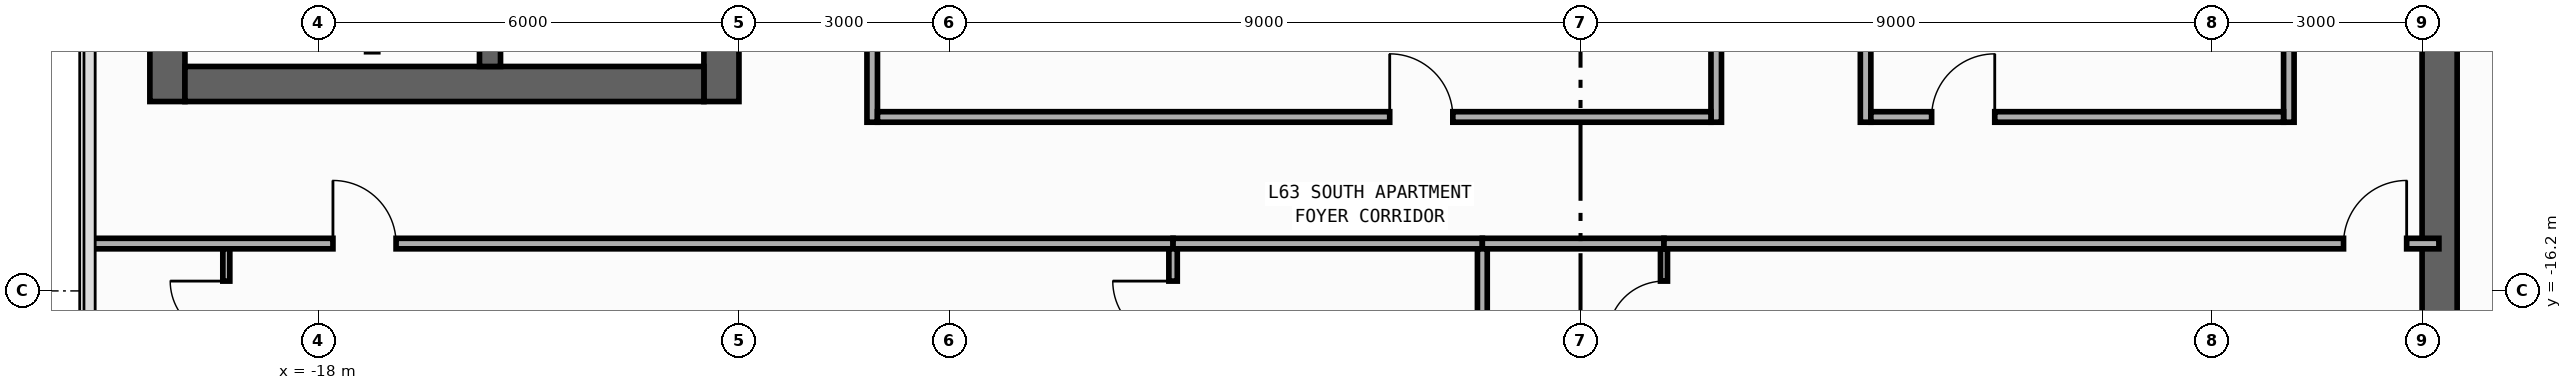
"""IFC4 building model, lengths in metres.
Left out: names, types, materials, properties, quantities, classifications, styles, units other than length and angle.
Written with IfcOpenShell. Run it as: python <this file> out.ifc"""

import sys

from ifc_helpers import new_model, si_unit, direction, frame, frame_2d, origin, place, context, subcontext, project, spatial, rectangle, extrude, element, fill, save


model = new_model("IFC4")
c1 = context("Model", 3, precision=1e-05, world=origin(), true_north=direction((0.0, 1.0)))
c2 = subcontext(c1, "Body", "Model", "MODEL_VIEW")
j1 = project(units=[si_unit("LENGTHUNIT", "METRE"), si_unit("PLANEANGLEUNIT", "RADIAN")], contexts=[c1])
p1 = place(None, origin())
s1 = spatial("IfcSite", under=j1, at=p1, CompositionType="ELEMENT")
p2 = place(p1, origin())
s2 = spatial("IfcBuilding", under=s1, at=p2, CompositionType="ELEMENT")
p3 = place(p2, frame((0.0, 0.0, 265.6)))
s3 = spatial("IfcBuildingStorey", under=s2, at=p3, CompositionType="ELEMENT", Elevation=265.6)
p4 = place(p3, frame((-20.15, -13.5, 0.0), z_axis=(0.0, 0.0, 1.0), x_axis=(0.0, 1.0, 0.0)))
e1 = element("IfcWall", 1, at=p4, inside=s3, PredefinedType="SHEAR", context=c2, shape_type="SweptSolid", body=[
    extrude(rectangle(XDim=27.0, YDim=0.5, at=frame_2d((13.5, 0.0))), origin(), (0.0, 0.0, 1.0), 3.34),
])
p5 = place(p3, frame((-12.25, -13.5, 0.0), z_axis=(0.0, 0.0, 1.0), x_axis=(0.0, 1.0, 0.0)))
e2 = element("IfcWall", 2, at=p5, inside=s3, PredefinedType="SHEAR", context=c2, shape_type="SweptSolid", body=[
    extrude(rectangle(XDim=27.0, YDim=0.5, at=frame_2d((13.5, 0.0))), origin(), (0.0, 0.0, 1.0), 3.34),
])
p6 = place(p5, frame((15.175, 0.0, 0.0)))
e3 = element("IfcOpeningElement", 3, at=p6, cuts=e2, PredefinedType="OPENING", context=c2, shape_type="SweptSolid", body=[
    extrude(rectangle(XDim=0.85, YDim=2.1, at=frame_2d((0.425, 1.05))), frame((0.0, 0.26, 0.0), z_axis=(0.0, -1.0, 0.0), x_axis=(1.0, 0.0, 0.0)), (0.0, 0.0, 1.0), 0.52),
])
p7 = place(p5, frame((21.275, 0.0, 0.0)))
e4 = element("IfcOpeningElement", 4, at=p7, cuts=e2, PredefinedType="OPENING", context=c2, shape_type="SweptSolid", body=[
    extrude(rectangle(XDim=0.85, YDim=2.1, at=frame_2d((0.425, 1.05))), frame((0.0, 0.26, 0.0), z_axis=(0.0, -1.0, 0.0), x_axis=(1.0, 0.0, 0.0)), (0.0, 0.0, 1.0), 0.52),
])
p8 = place(p5, frame((4.275, 0.0, 0.0)))
e5 = element("IfcOpeningElement", 5, at=p8, cuts=e2, PredefinedType="OPENING", context=c2, shape_type="SweptSolid", body=[
    extrude(rectangle(XDim=0.85, YDim=2.1, at=frame_2d((0.425, 1.05))), frame((0.0, 0.26, 0.0), z_axis=(0.0, -1.0, 0.0), x_axis=(1.0, 0.0, 0.0)), (0.0, 0.0, 1.0), 0.52),
])
p9 = place(p5, frame((10.275, 0.0, 0.0)))
e6 = element("IfcOpeningElement", 6, at=p9, cuts=e2, PredefinedType="OPENING", context=c2, shape_type="SweptSolid", body=[
    extrude(rectangle(XDim=0.85, YDim=2.1, at=frame_2d((0.425, 1.05))), frame((0.0, 0.26, 0.0), z_axis=(0.0, -1.0, 0.0), x_axis=(1.0, 0.0, 0.0)), (0.0, 0.0, 1.0), 0.52),
])
p10 = place(p5, frame((12.725, 0.0, 0.0)))
e7 = element("IfcOpeningElement", 7, at=p10, cuts=e2, PredefinedType="OPENING", context=c2, shape_type="SweptSolid", body=[
    extrude(rectangle(XDim=1.15, YDim=2.2, at=frame_2d((0.575, 1.1))), frame((0.0, 0.26, 0.0), z_axis=(0.0, -1.0, 0.0), x_axis=(1.0, 0.0, 0.0)), (0.0, 0.0, 1.0), 0.52),
])
p11 = place(p5, frame((1.625, 0.0, 0.0)))
e8 = element("IfcOpeningElement", 8, at=p11, cuts=e2, PredefinedType="OPENING", context=c2, shape_type="SweptSolid", body=[
    extrude(rectangle(XDim=0.85, YDim=2.1, at=frame_2d((0.425, 1.05))), frame((0.0, 0.26, 0.0), z_axis=(0.0, -1.0, 0.0), x_axis=(1.0, 0.0, 0.0)), (0.0, 0.0, 1.0), 0.52),
])
p12 = place(p3, frame((-19.9, -13.25, 0.0), z_axis=(0.0, 0.0, 1.0), x_axis=(1.0, 0.0, 0.0)))
e9 = element("IfcWall", 9, at=p12, inside=s3, PredefinedType="SHEAR", context=c2, shape_type="SweptSolid", body=[
    extrude(rectangle(XDim=7.4, YDim=0.5, at=frame_2d((3.7, 0.0))), origin(), (0.0, 0.0, 1.0), 3.34),
])
p13 = place(p3, frame((-15.55, -13.0, 0.0), z_axis=(0.0, 0.0, 1.0), x_axis=(0.0, 1.0, 0.0)))
e10 = element("IfcWall", 10, at=p13, inside=s3, PredefinedType="SHEAR", context=c2, shape_type="SweptSolid", body=[
    extrude(rectangle(XDim=26.0, YDim=0.3, at=frame_2d((13.0, 0.0))), origin(), (0.0, 0.0, 1.0), 3.34),
])
p14 = place(p13, frame((12.225, 0.0, 0.0)))
e11 = element("IfcOpeningElement", 11, at=p14, cuts=e10, PredefinedType="OPENING", context=c2, shape_type="SweptSolid", body=[
    extrude(rectangle(XDim=1.15, YDim=2.2, at=frame_2d((0.575, 1.1))), frame((0.0, 0.16, 0.0), z_axis=(0.0, -1.0, 0.0), x_axis=(1.0, 0.0, 0.0)), (0.0, 0.0, 1.0), 0.32),
])
p15 = place(p13, frame((1.125, 0.0, 0.0)))
e12 = element("IfcOpeningElement", 12, at=p15, cuts=e10, PredefinedType="OPENING", context=c2, shape_type="SweptSolid", body=[
    extrude(rectangle(XDim=0.85, YDim=2.1, at=frame_2d((0.425, 1.05))), frame((0.0, 0.16, 0.0), z_axis=(0.0, -1.0, 0.0), x_axis=(1.0, 0.0, 0.0)), (0.0, 0.0, 1.0), 0.32),
])
p16 = place(p3, frame((12.25, -19.8, 0.0), z_axis=(0.0, 0.0, 1.0), x_axis=(0.0, 1.0, 0.0)))
e13 = element("IfcWall", 13, at=p16, inside=s3, PredefinedType="SHEAR", context=c2, shape_type="SweptSolid", body=[
    extrude(rectangle(XDim=27.0, YDim=0.5, at=frame_2d((13.5, 0.0))), origin(), (0.0, 0.0, 1.0), 3.34),
])
p17 = place(p16, frame((23.05, 0.0, 0.0)))
e14 = element("IfcOpeningElement", 14, at=p17, cuts=e13, PredefinedType="OPENING", context=c2, shape_type="SweptSolid", body=[
    extrude(rectangle(XDim=1.1, YDim=2.2, at=frame_2d((0.55, 1.1))), frame((0.0, 0.26, 0.0), z_axis=(0.0, -1.0, 0.0), x_axis=(1.0, 0.0, 0.0)), (0.0, 0.0, 1.0), 0.52),
])
p18 = place(p16, frame((19.85, 0.0, 0.0)))
e15 = element("IfcOpeningElement", 15, at=p18, cuts=e13, PredefinedType="OPENING", context=c2, shape_type="SweptSolid", body=[
    extrude(rectangle(XDim=1.1, YDim=2.2, at=frame_2d((0.55, 1.1))), frame((0.0, 0.26, 0.0), z_axis=(0.0, -1.0, 0.0), x_axis=(1.0, 0.0, 0.0)), (0.0, 0.0, 1.0), 0.52),
])
p19 = place(p16, frame((16.65, 0.0, 0.0)))
e16 = element("IfcOpeningElement", 16, at=p19, cuts=e13, PredefinedType="OPENING", context=c2, shape_type="SweptSolid", body=[
    extrude(rectangle(XDim=1.1, YDim=2.2, at=frame_2d((0.55, 1.1))), frame((0.0, 0.26, 0.0), z_axis=(0.0, -1.0, 0.0), x_axis=(1.0, 0.0, 0.0)), (0.0, 0.0, 1.0), 0.52),
])
p20 = place(p16, frame((10.175, 0.0, 0.0)))
e17 = element("IfcOpeningElement", 17, at=p20, cuts=e13, PredefinedType="OPENING", context=c2, shape_type="SweptSolid", body=[
    extrude(rectangle(XDim=0.85, YDim=2.1, at=frame_2d((0.425, 1.05))), frame((0.0, 0.26, 0.0), z_axis=(0.0, -1.0, 0.0), x_axis=(1.0, 0.0, 0.0)), (0.0, 0.0, 1.0), 0.52),
])
p21 = place(p16, frame((12.725, 0.0, 0.0)))
e18 = element("IfcOpeningElement", 18, at=p21, cuts=e13, PredefinedType="OPENING", context=c2, shape_type="SweptSolid", body=[
    extrude(rectangle(XDim=1.15, YDim=2.2, at=frame_2d((0.575, 1.1))), frame((0.0, 0.26, 0.0), z_axis=(0.0, -1.0, 0.0), x_axis=(1.0, 0.0, 0.0)), (0.0, 0.0, 1.0), 0.52),
])
p22 = place(p16, frame((25.125, 0.0, 0.0)))
e19 = element("IfcOpeningElement", 19, at=p22, cuts=e13, PredefinedType="OPENING", context=c2, shape_type="SweptSolid", body=[
    extrude(rectangle(XDim=0.85, YDim=2.1, at=frame_2d((0.425, 1.05))), frame((0.0, 0.26, 0.0), z_axis=(0.0, -1.0, 0.0), x_axis=(1.0, 0.0, 0.0)), (0.0, 0.0, 1.0), 0.52),
])
p23 = place(p3, frame((-10.1, -13.795, 0.0), z_axis=(0.0, 0.0, 1.0), x_axis=(0.0, 1.0, 0.0)))
e20 = element("IfcWall", 20, at=p23, inside=s3, PredefinedType="PARTITIONING", context=c2, shape_type="SweptSolid", body=[
    extrude(rectangle(XDim=15.605, YDim=0.15, at=frame_2d((7.802, 0.0))), origin(), (0.0, 0.0, 1.0), 3.34),
])
p24 = place(p23, frame((7.961, 0.0, 0.0)))
e21 = element("IfcOpeningElement", 21, at=p24, cuts=e20, PredefinedType="OPENING", context=c2, shape_type="SweptSolid", body=[
    extrude(rectangle(XDim=0.9, YDim=2.15, at=frame_2d((0.45, 1.075))), frame((0.0, 0.085, 0.0), z_axis=(0.0, -1.0, 0.0), x_axis=(1.0, 0.0, 0.0)), (0.0, 0.0, 1.0), 0.17),
])
p25 = place(p3, frame((10.1, -13.795, 0.0), z_axis=(0.0, 0.0, 1.0), x_axis=(0.0, 1.0, 0.0)))
e22 = element("IfcWall", 22, at=p25, inside=s3, PredefinedType="PARTITIONING", context=c2, shape_type="SweptSolid", body=[
    extrude(rectangle(XDim=12.975, YDim=0.15, at=frame_2d((6.487, 0.0))), origin(), (0.0, 0.0, 1.0), 3.34),
])
p26 = place(p25, frame((7.964, 0.0, 0.0)))
e23 = element("IfcOpeningElement", 23, at=p26, cuts=e22, PredefinedType="OPENING", context=c2, shape_type="SweptSolid", body=[
    extrude(rectangle(XDim=0.9, YDim=2.15, at=frame_2d((0.45, 1.075))), frame((0.0, 0.085, 0.0), z_axis=(0.0, -1.0, 0.0), x_axis=(1.0, 0.0, 0.0)), (0.0, 0.0, 1.0), 0.17),
])
p27 = place(p3, frame((1.935, -13.795, 0.0), z_axis=(0.0, 0.0, 1.0), x_axis=(0.0, 1.0, 0.0)))
e24 = element("IfcWall", 24, at=p27, inside=s3, PredefinedType="PARTITIONING", context=c2, shape_type="SweptSolid", body=[
    extrude(rectangle(XDim=15.455, YDim=0.15, at=frame_2d((7.728, 0.0))), origin(), (0.0, 0.0, 1.0), 3.34),
])
p28 = place(p27, frame((7.879, 0.0, 0.0)))
e25 = element("IfcOpeningElement", 25, at=p28, cuts=e24, PredefinedType="OPENING", context=c2, shape_type="SweptSolid", body=[
    extrude(rectangle(XDim=0.9, YDim=2.15, at=frame_2d((0.45, 1.075))), frame((0.0, 0.085, 0.0), z_axis=(0.0, -1.0, 0.0), x_axis=(1.0, 0.0, 0.0)), (0.0, 0.0, 1.0), 0.17),
])
p29 = place(p3, frame((4.065, -13.795, 0.0), z_axis=(0.0, 0.0, 1.0), x_axis=(0.0, 1.0, 0.0)))
e26 = element("IfcWall", 26, at=p29, inside=s3, PredefinedType="PARTITIONING", context=c2, shape_type="SweptSolid", body=[
    extrude(rectangle(XDim=12.815, YDim=0.15, at=frame_2d((6.407, 0.0))), origin(), (0.0, 0.0, 1.0), 3.34),
])
p30 = place(p29, frame((7.994, 0.0, 0.0)))
e27 = element("IfcOpeningElement", 27, at=p30, cuts=e26, PredefinedType="OPENING", context=c2, shape_type="SweptSolid", body=[
    extrude(rectangle(XDim=0.9, YDim=2.15, at=frame_2d((0.45, 1.075))), frame((0.0, 0.085, 0.0), z_axis=(0.0, -1.0, 0.0), x_axis=(1.0, 0.0, 0.0)), (0.0, 0.0, 1.0), 0.17),
])
p31 = place(p3, frame((-21.255, -15.525, 0.0), z_axis=(0.0, 0.0, 1.0), x_axis=(1.0, 0.0, 0.0)))
e28 = element("IfcWall", 28, at=p31, inside=s3, PredefinedType="PARTITIONING", context=c2, shape_type="SweptSolid", body=[
    extrude(rectangle(XDim=15.445, YDim=0.15, at=frame_2d((7.722, 0.0))), origin(), (0.0, 0.0, 1.0), 3.34),
])
p32 = place(p31, frame((3.466, 0.0, 0.0)))
e29 = element("IfcOpeningElement", 29, at=p32, cuts=e28, PredefinedType="OPENING", context=c2, shape_type="SweptSolid", body=[
    extrude(rectangle(XDim=0.9, YDim=2.15, at=frame_2d((0.45, 1.075))), frame((0.0, 0.085, 0.0), z_axis=(0.0, -1.0, 0.0), x_axis=(1.0, 0.0, 0.0)), (0.0, 0.0, 1.0), 0.17),
])
p33 = place(p3, frame((-5.81, -15.525, 0.0), z_axis=(0.0, 0.0, 1.0), x_axis=(1.0, 0.0, 0.0)))
e30 = element("IfcWall", 30, at=p33, inside=s3, PredefinedType="PARTITIONING", context=c2, shape_type="SweptSolid", body=[
    extrude(rectangle(XDim=4.41, YDim=0.15, at=frame_2d((2.205, 0.0))), origin(), (0.0, 0.0, 1.0), 3.34),
])
p34 = place(p3, frame((-1.4, -15.525, 0.0), z_axis=(0.0, 0.0, 1.0), x_axis=(1.0, 0.0, 0.0)))
e31 = element("IfcWall", 31, at=p34, inside=s3, PredefinedType="PARTITIONING", context=c2, shape_type="SweptSolid", body=[
    extrude(rectangle(XDim=2.59, YDim=0.15, at=frame_2d((1.295, 0.0))), origin(), (0.0, 0.0, 1.0), 3.34),
])
p35 = place(p3, frame((1.19, -15.525, 0.0), z_axis=(0.0, 0.0, 1.0), x_axis=(1.0, 0.0, 0.0)))
e32 = element("IfcWall", 32, at=p35, inside=s3, PredefinedType="PARTITIONING", context=c2, shape_type="SweptSolid", body=[
    extrude(rectangle(XDim=11.05, YDim=0.15, at=frame_2d((5.525, 0.0))), origin(), (0.0, 0.0, 1.0), 3.34),
])
p36 = place(p35, frame((9.69, 0.0, 0.0)))
e33 = element("IfcOpeningElement", 33, at=p36, cuts=e32, PredefinedType="OPENING", context=c2, shape_type="SweptSolid", body=[
    extrude(rectangle(XDim=0.9, YDim=2.15, at=frame_2d((0.45, 1.075))), frame((0.0, 0.085, 0.0), z_axis=(0.0, -1.0, 0.0), x_axis=(1.0, 0.0, 0.0)), (0.0, 0.0, 1.0), 0.17),
])
p37 = place(p3, frame((-10.025, -13.72, 0.0), z_axis=(0.0, 0.0, 1.0), x_axis=(1.0, 0.0, 0.0)))
e34 = element("IfcWall", 34, at=p37, inside=s3, PredefinedType="PARTITIONING", context=c2, shape_type="SweptSolid", body=[
    extrude(rectangle(XDim=11.885, YDim=0.15, at=frame_2d((5.942, 0.0))), origin(), (0.0, 0.0, 1.0), 3.34),
])
p38 = place(p37, frame((7.304, 0.0, 0.0)))
e35 = element("IfcOpeningElement", 35, at=p38, cuts=e34, PredefinedType="OPENING", context=c2, shape_type="SweptSolid", body=[
    extrude(rectangle(XDim=0.9, YDim=2.15, at=frame_2d((0.45, 1.075))), frame((0.0, 0.085, 0.0), z_axis=(0.0, -1.0, 0.0), x_axis=(1.0, 0.0, 0.0)), (0.0, 0.0, 1.0), 0.17),
])
p39 = place(p3, frame((4.14, -13.72, 0.0), z_axis=(0.0, 0.0, 1.0), x_axis=(1.0, 0.0, 0.0)))
e36 = element("IfcWall", 36, at=p39, inside=s3, PredefinedType="PARTITIONING", context=c2, shape_type="SweptSolid", body=[
    extrude(rectangle(XDim=5.885, YDim=0.15, at=frame_2d((2.942, 0.0))), origin(), (0.0, 0.0, 1.0), 3.34),
])
p40 = place(p39, frame((0.866, 0.0, 0.0)))
e37 = element("IfcOpeningElement", 37, at=p40, cuts=e36, PredefinedType="OPENING", context=c2, shape_type="SweptSolid", body=[
    extrude(rectangle(XDim=0.9, YDim=2.15, at=frame_2d((0.45, 1.075))), frame((0.0, 0.085, 0.0), z_axis=(0.0, -1.0, 0.0), x_axis=(1.0, 0.0, 0.0)), (0.0, 0.0, 1.0), 0.17),
])
p41 = place(p3, frame((-19.31, -18.1, 0.0), z_axis=(0.0, 0.0, 1.0), x_axis=(0.0, 1.0, 0.0)))
e38 = element("IfcWall", 38, at=p41, inside=s3, PredefinedType="PARTITIONING", context=c2, shape_type="SweptSolid", body=[
    extrude(rectangle(XDim=2.5, YDim=0.1, at=frame_2d((1.25, 0.0))), origin(), (0.0, 0.0, 1.0), 3.34),
])
p42 = place(p41, frame((1.24, 0.0, 0.0)))
e39 = element("IfcOpeningElement", 39, at=p42, cuts=e38, PredefinedType="OPENING", context=c2, shape_type="SweptSolid", body=[
    extrude(rectangle(XDim=0.8, YDim=2.1, at=frame_2d((0.4, 1.05))), frame((0.0, 0.06, 0.0), z_axis=(0.0, -1.0, 0.0), x_axis=(1.0, 0.0, 0.0)), (0.0, 0.0, 1.0), 0.12),
])
p43 = place(p3, frame((-5.81, -20.1, 0.0), z_axis=(0.0, 0.0, 1.0), x_axis=(0.0, 1.0, 0.0)))
e40 = element("IfcWall", 40, at=p43, inside=s3, PredefinedType="PARTITIONING", context=c2, shape_type="SweptSolid", body=[
    extrude(rectangle(XDim=4.5, YDim=0.12, at=frame_2d((2.25, 0.0))), origin(), (0.0, 0.0, 1.0), 3.34),
])
p44 = place(p43, frame((3.18, 0.0, 0.0)))
e41 = element("IfcOpeningElement", 41, at=p44, cuts=e40, PredefinedType="OPENING", context=c2, shape_type="SweptSolid", body=[
    extrude(rectangle(XDim=0.86, YDim=2.15, at=frame_2d((0.43, 1.075))), frame((0.0, 0.07, 0.0), z_axis=(0.0, -1.0, 0.0), x_axis=(1.0, 0.0, 0.0)), (0.0, 0.0, 1.0), 0.14),
])
p45 = place(p3, frame((-1.4, -18.1, 0.0), z_axis=(0.0, 0.0, 1.0), x_axis=(0.0, 1.0, 0.0)))
e42 = element("IfcWall", 42, at=p45, inside=s3, PredefinedType="PARTITIONING", context=c2, shape_type="SweptSolid", body=[
    extrude(rectangle(XDim=2.5, YDim=0.14, at=frame_2d((1.25, 0.0))), origin(), (0.0, 0.0, 1.0), 3.34),
])
p46 = place(p3, frame((1.19, -18.1, 0.0), z_axis=(0.0, 0.0, 1.0), x_axis=(0.0, 1.0, 0.0)))
e43 = element("IfcWall", 43, at=p46, inside=s3, PredefinedType="PARTITIONING", context=c2, shape_type="SweptSolid", body=[
    extrude(rectangle(XDim=2.5, YDim=0.1, at=frame_2d((1.25, 0.0))), origin(), (0.0, 0.0, 1.0), 3.34),
])
p47 = place(p46, frame((1.24, 0.0, 0.0)))
e44 = element("IfcOpeningElement", 44, at=p47, cuts=e43, PredefinedType="OPENING", context=c2, shape_type="SweptSolid", body=[
    extrude(rectangle(XDim=0.8, YDim=2.1, at=frame_2d((0.4, 1.05))), frame((0.0, 0.06, 0.0), z_axis=(0.0, -1.0, 0.0), x_axis=(1.0, 0.0, 0.0)), (0.0, 0.0, 1.0), 0.12),
])
p48 = place(p32, origin())
e45 = element("IfcDoor", 45, at=p48, inside=s3, OperationType="SINGLE_SWING_LEFT", PredefinedType="DOOR", context=c2, shape_type="SweptSolid", body=[
    extrude(rectangle(XDim=0.9, YDim=2.15, at=frame_2d((0.45, 1.075))), frame((0.0, 0.025, 0.0), z_axis=(0.0, -1.0, 0.0), x_axis=(1.0, 0.0, 0.0)), (0.0, 0.0, 1.0), 0.05),
])
fill(e29, e45)
p49 = place(p36, origin())
e46 = element("IfcDoor", 46, at=p49, inside=s3, OperationType="SINGLE_SWING_RIGHT", PredefinedType="DOOR", context=c2, shape_type="SweptSolid", body=[
    extrude(rectangle(XDim=0.9, YDim=2.15, at=frame_2d((0.45, 1.075))), frame((0.0, 0.025, 0.0), z_axis=(0.0, -1.0, 0.0), x_axis=(1.0, 0.0, 0.0)), (0.0, 0.0, 1.0), 0.05),
])
fill(e33, e46)
p50 = place(p38, origin())
e47 = element("IfcDoor", 47, at=p50, inside=s3, OperationType="SINGLE_SWING_LEFT", PredefinedType="DOOR", context=c2, shape_type="SweptSolid", body=[
    extrude(rectangle(XDim=0.9, YDim=2.15, at=frame_2d((0.45, 1.075))), frame((0.0, 0.025, 0.0), z_axis=(0.0, -1.0, 0.0), x_axis=(1.0, 0.0, 0.0)), (0.0, 0.0, 1.0), 0.05),
])
fill(e35, e47)
p51 = place(p40, origin())
e48 = element("IfcDoor", 48, at=p51, inside=s3, OperationType="SINGLE_SWING_RIGHT", PredefinedType="DOOR", context=c2, shape_type="SweptSolid", body=[
    extrude(rectangle(XDim=0.9, YDim=2.15, at=frame_2d((0.45, 1.075))), frame((0.0, 0.025, 0.0), z_axis=(0.0, -1.0, 0.0), x_axis=(1.0, 0.0, 0.0)), (0.0, 0.0, 1.0), 0.05),
])
fill(e37, e48)
p52 = place(p42, origin())
e49 = element("IfcDoor", 49, at=p52, inside=s3, OperationType="SINGLE_SWING_RIGHT", PredefinedType="DOOR", context=c2, shape_type="SweptSolid", body=[
    extrude(rectangle(XDim=0.8, YDim=2.1, at=frame_2d((0.4, 1.05))), frame((0.0, 0.025, 0.0), z_axis=(0.0, -1.0, 0.0), x_axis=(1.0, 0.0, 0.0)), (0.0, 0.0, 1.0), 0.05),
])
fill(e39, e49)
p53 = place(p44, origin())
e50 = element("IfcDoor", 50, at=p53, inside=s3, OperationType="SINGLE_SWING_RIGHT", PredefinedType="DOOR", context=c2, shape_type="SweptSolid", body=[
    extrude(rectangle(XDim=0.86, YDim=2.15, at=frame_2d((0.43, 1.075))), frame((0.0, 0.025, 0.0), z_axis=(0.0, -1.0, 0.0), x_axis=(1.0, 0.0, 0.0)), (0.0, 0.0, 1.0), 0.05),
])
fill(e41, e50)
p54 = place(p47, origin())
e51 = element("IfcDoor", 51, at=p54, inside=s3, OperationType="SINGLE_SWING_LEFT", PredefinedType="DOOR", context=c2, shape_type="SweptSolid", body=[
    extrude(rectangle(XDim=0.8, YDim=2.1, at=frame_2d((0.4, 1.05))), frame((0.0, 0.025, 0.0), z_axis=(0.0, -1.0, 0.0), x_axis=(1.0, 0.0, 0.0)), (0.0, 0.0, 1.0), 0.05),
])
fill(e44, e51)
save(model, sys.argv[1])
